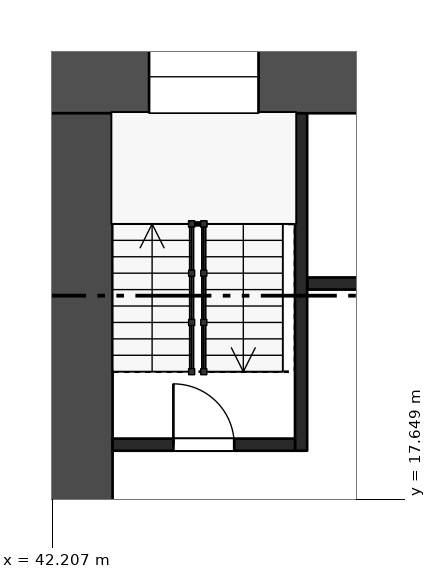
"""IFC4 building model, lengths in metres.
Left out: names, types, materials, properties, quantities, classifications, styles, units other than length and angle.
Written with IfcOpenShell. Run it as: python <this file> out.ifc"""

import sys

from ifc_helpers import new_model, si_unit, direction, frame, frame_2d, origin, place, context, subcontext, project, spatial, rectangle, extrude, element, fill, save


model = new_model("IFC4")
c1 = context("Model", 3, precision=1e-05, world=origin(), true_north=direction((0.0, 1.0)))
c2 = subcontext(c1, "Body", "Model", "MODEL_VIEW")
j1 = project(units=[si_unit("LENGTHUNIT", "METRE"), si_unit("PLANEANGLEUNIT", "RADIAN")], contexts=[c1])
p1 = place(None, origin())
s1 = spatial("IfcSite", under=j1, at=p1, CompositionType="ELEMENT")
p2 = place(p1, origin())
s2 = spatial("IfcBuilding", under=s1, at=p2, CompositionType="ELEMENT")
p3 = place(p2, frame((0.0, 0.0, 126.7)))
s3 = spatial("IfcBuildingStorey", under=s2, at=p3, CompositionType="ELEMENT", Elevation=126.7)
p4 = place(p3, frame((42.0, 24.6, 0.0), z_axis=(0.0, 0.0, 1.0), x_axis=(1.0, 0.0, 0.0)))
e1 = element("IfcWall", 1, at=p4, inside=s3, PredefinedType="SHEAR", context=c2, shape_type="SweptSolid", body=[
    extrude(rectangle(XDim=16.8, YDim=1.2, at=frame_2d((8.4, 0.0))), origin(), (0.0, 0.0, 1.0), 3.22),
])
p5 = place(p4, frame((1.8, 0.0, 0.5)))
e2 = element("IfcOpeningElement", 2, at=p5, cuts=e1, PredefinedType="OPENING", context=c2, shape_type="SweptSolid", body=[
    extrude(rectangle(XDim=1.8, YDim=2.4, at=frame_2d((0.9, 1.2))), frame((0.0, 0.61, 0.0), z_axis=(0.0, -1.0, 0.0), x_axis=(1.0, 0.0, 0.0)), (0.0, 0.0, 1.0), 1.22),
])
p6 = place(p4, frame((5.25, 0.0, 1.6)))
e3 = element("IfcOpeningElement", 3, at=p6, cuts=e1, PredefinedType="OPENING", context=c2, shape_type="SweptSolid", body=[
    extrude(rectangle(XDim=3.0, YDim=1.2, at=frame_2d((1.5, 0.6))), frame((0.0, 0.61, 0.0), z_axis=(0.0, -1.0, 0.0), x_axis=(1.0, 0.0, 0.0)), (0.0, 0.0, 1.0), 1.22),
])
p7 = place(p4, frame((12.65, 0.0, 0.6)))
e4 = element("IfcOpeningElement", 4, at=p7, cuts=e1, PredefinedType="OPENING", context=c2, shape_type="SweptSolid", body=[
    extrude(rectangle(XDim=1.0, YDim=2.1, at=frame_2d((0.5, 1.05))), frame((0.0, 0.61, 0.0), z_axis=(0.0, -1.0, 0.0), x_axis=(1.0, 0.0, 0.0)), (0.0, 0.0, 1.0), 1.22),
])
p8 = place(p4, frame((14.175, 0.0, 1.6)))
e5 = element("IfcOpeningElement", 5, at=p8, cuts=e1, PredefinedType="OPENING", context=c2, shape_type="SweptSolid", body=[
    extrude(rectangle(XDim=1.2, YDim=1.2, at=frame_2d((0.6, 0.6))), frame((0.0, 0.61, 0.0), z_axis=(0.0, -1.0, 0.0), x_axis=(1.0, 0.0, 0.0)), (0.0, 0.0, 1.0), 1.22),
])
p9 = place(p3, frame((42.6, 9.6, 0.0), z_axis=(0.0, 0.0, 1.0), x_axis=(0.0, 1.0, 0.0)))
e6 = element("IfcWall", 6, at=p9, inside=s3, PredefinedType="SHEAR", context=c2, shape_type="SweptSolid", body=[
    extrude(rectangle(XDim=14.4, YDim=1.2, at=frame_2d((7.2, 0.0))), origin(), (0.0, 0.0, 1.0), 3.22),
])
p10 = place(p9, frame((2.1, 0.0, 0.0)))
e7 = element("IfcOpeningElement", 7, at=p10, cuts=e6, PredefinedType="OPENING", context=c2, shape_type="SweptSolid", body=[
    extrude(rectangle(XDim=1.8, YDim=2.1, at=frame_2d((0.9, 1.05))), frame((0.0, 0.61, 0.0), z_axis=(0.0, -1.0, 0.0), x_axis=(1.0, 0.0, 0.0)), (0.0, 0.0, 1.0), 1.22),
])
p11 = place(p3, frame((46.4, 21.2, 0.0), z_axis=(0.0, 0.0, 1.0), x_axis=(1.0, 0.0, 0.0)))
e8 = element("IfcWall", 8, at=p11, inside=s3, PredefinedType="SHEAR", context=c2, shape_type="SweptSolid", body=[
    extrude(rectangle(XDim=8.0, YDim=0.2, at=frame_2d((4.0, 0.0))), origin(), (0.0, 0.0, 1.0), 3.22),
])
p12 = place(p11, frame((1.5, 0.0, 0.0)))
e9 = element("IfcOpeningElement", 9, at=p12, cuts=e8, PredefinedType="OPENING", context=c2, shape_type="SweptSolid", body=[
    extrude(rectangle(XDim=0.9, YDim=2.1, at=frame_2d((0.45, 1.05))), frame((0.0, 0.11, 0.0), z_axis=(0.0, -1.0, 0.0), x_axis=(1.0, 0.0, 0.0)), (0.0, 0.0, 1.0), 0.22),
])
p13 = place(p11, frame((4.55, 0.0, 0.0)))
e10 = element("IfcOpeningElement", 10, at=p13, cuts=e8, PredefinedType="OPENING", context=c2, shape_type="SweptSolid", body=[
    extrude(rectangle(XDim=1.1, YDim=2.1, at=frame_2d((0.55, 1.05))), frame((0.0, 0.11, 0.0), z_axis=(0.0, -1.0, 0.0), x_axis=(1.0, 0.0, 0.0)), (0.0, 0.0, 1.0), 0.22),
])
p14 = place(p11, frame((6.6, 0.0, 0.0)))
e11 = element("IfcOpeningElement", 11, at=p14, cuts=e8, PredefinedType="OPENING", context=c2, shape_type="SweptSolid", body=[
    extrude(rectangle(XDim=1.1, YDim=2.1, at=frame_2d((0.55, 1.05))), frame((0.0, 0.11, 0.0), z_axis=(0.0, -1.0, 0.0), x_axis=(1.0, 0.0, 0.0)), (0.0, 0.0, 1.0), 0.22),
])
p15 = place(p3, frame((46.3, 18.45, 0.0), z_axis=(0.0, 0.0, 1.0), x_axis=(0.0, 1.0, 0.0)))
e12 = element("IfcWall", 12, at=p15, inside=s3, PredefinedType="SHEAR", context=c2, shape_type="SweptSolid", body=[
    extrude(rectangle(XDim=5.55, YDim=0.2, at=frame_2d((2.775, 0.0))), origin(), (0.0, 0.0, 1.0), 3.22),
])
p16 = place(p3, frame((43.2, 18.55, 0.0), z_axis=(0.0, 0.0, 1.0), x_axis=(1.0, 0.0, 0.0)))
e13 = element("IfcWall", 13, at=p16, inside=s3, PredefinedType="SHEAR", context=c2, shape_type="SweptSolid", body=[
    extrude(rectangle(XDim=3.0, YDim=0.2, at=frame_2d((1.5, 0.0))), origin(), (0.0, 0.0, 1.0), 3.22),
])
p17 = place(p16, frame((1.0, 0.0, 0.0)))
e14 = element("IfcOpeningElement", 14, at=p17, cuts=e13, PredefinedType="OPENING", context=c2, shape_type="SweptSolid", body=[
    extrude(rectangle(XDim=1.0, YDim=2.1, at=frame_2d((0.5, 1.05))), frame((0.0, 0.11, 0.0), z_axis=(0.0, -1.0, 0.0), x_axis=(1.0, 0.0, 0.0)), (0.0, 0.0, 1.0), 0.22),
])
p18 = place(p17, origin())
e15 = element("IfcDoor", 15, at=p18, inside=s3, OperationType="SINGLE_SWING_LEFT", PredefinedType="DOOR", context=c2, shape_type="SweptSolid", body=[
    extrude(rectangle(XDim=1.0, YDim=2.1, at=frame_2d((0.5, 1.05))), frame((0.0, 0.025, 0.0), z_axis=(0.0, -1.0, 0.0), x_axis=(1.0, 0.0, 0.0)), (0.0, 0.0, 1.0), 0.05),
])
fill(e14, e15)
p19 = place(p5, origin())
e16 = element("IfcWindow", 16, at=p19, inside=s3, PartitioningType="SINGLE_PANEL", PredefinedType="WINDOW", context=c2, shape_type="SweptSolid", body=[
    extrude(rectangle(XDim=1.8, YDim=2.4, at=frame_2d((0.9, 1.2))), frame((0.0, 0.03, 0.0), z_axis=(0.0, -1.0, 0.0), x_axis=(1.0, 0.0, 0.0)), (0.0, 0.0, 1.0), 0.06),
])
fill(e2, e16)
save(model, sys.argv[1])
